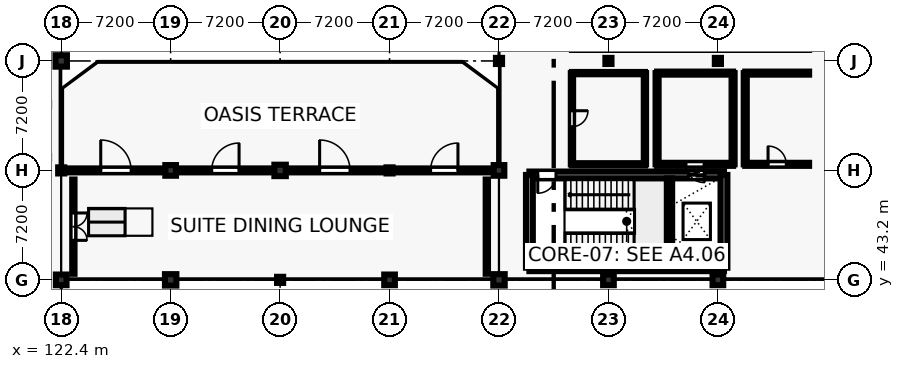
"""IFC4 building model, lengths in metres.
Left out: names, types, materials, properties, quantities, classifications, styles, units other than length and angle.
Written with IfcOpenShell. Run it as: python <this file> out.ifc"""

import sys

from ifc_helpers import new_model, si_unit, direction, frame, frame_2d, origin, origin_2d, place, context, subcontext, project, spatial, rectangle, hollow_rectangle, extrude, element, fill, save


model = new_model("IFC4")
c1 = context("Model", 3, precision=1e-05, world=origin(), true_north=direction((0.0, 1.0)))
c2 = subcontext(c1, "Body", "Model", "MODEL_VIEW")
j1 = project(units=[si_unit("LENGTHUNIT", "METRE"), si_unit("PLANEANGLEUNIT", "RADIAN")], contexts=[c1])
p1 = place(None, origin())
s1 = spatial("IfcSite", under=j1, at=p1, CompositionType="ELEMENT")
p2 = place(p1, origin())
s2 = spatial("IfcBuilding", under=s1, at=p2, CompositionType="ELEMENT")
p3 = place(p2, frame((0.0, 0.0, 9.6)))
s3 = spatial("IfcBuildingStorey", under=s2, at=p3, CompositionType="ELEMENT", Elevation=9.6)
p4 = place(p3, frame((122.4, 43.2, 0.0), z_axis=(0.0, 0.0, 1.0), x_axis=(1.0, 0.0, 0.0)))
e1 = element("IfcColumn", 1, at=p4, inside=s3, PredefinedType="COLUMN", context=c2, shape_type="SweptSolid", body=[
    extrude(rectangle(XDim=0.7, YDim=0.7, at=origin_2d()), origin(), (0.0, 0.0, 1.0), 4.2),
])
p5 = place(p3, frame((122.4, 50.4, 0.0), z_axis=(0.0, 0.0, 1.0), x_axis=(1.0, 0.0, 0.0)))
e2 = element("IfcColumn", 2, at=p5, inside=s3, PredefinedType="COLUMN", context=c2, shape_type="SweptSolid", body=[
    extrude(hollow_rectangle(XDim=0.4, YDim=0.4, WallThickness=0.02, at=origin_2d()), origin(), (0.0, 0.0, 1.0), 4.2),
])
for number, where, z_axis, x_axis in (
    (3, (122.4, 57.6, 0.0), (0.0, 0.0, 1.0), (1.0, 0.0, 0.0)),
    (4, (129.6, 43.2, 0.0), (0.0, 0.0, 1.0), (1.0, 0.0, 0.0)),
):
    element("IfcColumn", number, at=place(p3, frame(where, z_axis=z_axis, x_axis=x_axis)), inside=s3, PredefinedType="COLUMN", context=c2, shape_type="SweptSolid", body=[
        extrude(rectangle(XDim=0.75, YDim=0.75, at=origin_2d()), origin(), (0.0, 0.0, 1.0), 4.2),
    ])
p6 = place(p3, frame((129.6, 50.4, 0.0), z_axis=(0.0, 0.0, 1.0), x_axis=(1.0, 0.0, 0.0)))
e5 = element("IfcColumn", 5, at=p6, inside=s3, PredefinedType="COLUMN", context=c2, shape_type="SweptSolid", body=[
    extrude(rectangle(XDim=0.7, YDim=0.7, at=origin_2d()), origin(), (0.0, 0.0, 1.0), 4.2),
])
p7 = place(p3, frame((136.8, 43.2, 0.0), z_axis=(0.0, 0.0, 1.0), x_axis=(1.0, 0.0, 0.0)))
e6 = element("IfcColumn", 6, at=p7, inside=s3, PredefinedType="COLUMN", context=c2, shape_type="SweptSolid", body=[
    extrude(hollow_rectangle(XDim=0.4, YDim=0.4, WallThickness=0.02, at=origin_2d()), origin(), (0.0, 0.0, 1.0), 4.2),
])
p8 = place(p3, frame((136.8, 50.4, 0.0), z_axis=(0.0, 0.0, 1.0), x_axis=(1.0, 0.0, 0.0)))
e7 = element("IfcColumn", 7, at=p8, inside=s3, PredefinedType="COLUMN", context=c2, shape_type="SweptSolid", body=[
    extrude(rectangle(XDim=0.75, YDim=0.75, at=origin_2d()), origin(), (0.0, 0.0, 1.0), 4.2),
])
p9 = place(p3, frame((144.0, 43.2, 0.0), z_axis=(0.0, 0.0, 1.0), x_axis=(1.0, 0.0, 0.0)))
e8 = element("IfcColumn", 8, at=p9, inside=s3, PredefinedType="COLUMN", context=c2, shape_type="SweptSolid", body=[
    extrude(rectangle(XDim=0.7, YDim=0.7, at=origin_2d()), origin(), (0.0, 0.0, 1.0), 4.2),
])
p10 = place(p3, frame((144.0, 50.4, 0.0), z_axis=(0.0, 0.0, 1.0), x_axis=(1.0, 0.0, 0.0)))
e9 = element("IfcColumn", 9, at=p10, inside=s3, PredefinedType="COLUMN", context=c2, shape_type="SweptSolid", body=[
    extrude(hollow_rectangle(XDim=0.4, YDim=0.4, WallThickness=0.02, at=origin_2d()), origin(), (0.0, 0.0, 1.0), 4.2),
])
p11 = place(p3, frame((151.2, 43.2, 0.0), z_axis=(0.0, 0.0, 1.0), x_axis=(1.0, 0.0, 0.0)))
e10 = element("IfcColumn", 10, at=p11, inside=s3, PredefinedType="COLUMN", context=c2, shape_type="SweptSolid", body=[
    extrude(rectangle(XDim=0.75, YDim=0.75, at=origin_2d()), origin(), (0.0, 0.0, 1.0), 4.2),
])
p12 = place(p3, frame((151.2, 50.4, 0.0), z_axis=(0.0, 0.0, 1.0), x_axis=(1.0, 0.0, 0.0)))
e11 = element("IfcColumn", 11, at=p12, inside=s3, PredefinedType="COLUMN", context=c2, shape_type="SweptSolid", body=[
    extrude(rectangle(XDim=0.7, YDim=0.7, at=origin_2d()), origin(), (0.0, 0.0, 1.0), 4.2),
])
p13 = place(p3, frame((151.2, 57.6, 0.0), z_axis=(0.0, 0.0, 1.0), x_axis=(1.0, 0.0, 0.0)))
e12 = element("IfcColumn", 12, at=p13, inside=s3, PredefinedType="COLUMN", context=c2, shape_type="SweptSolid", body=[
    extrude(hollow_rectangle(XDim=0.4, YDim=0.4, WallThickness=0.02, at=origin_2d()), origin(), (0.0, 0.0, 1.0), 4.2),
])
p14 = place(p3, frame((158.4, 43.2, 0.0), z_axis=(0.0, 0.0, 1.0), x_axis=(1.0, 0.0, 0.0)))
e13 = element("IfcColumn", 13, at=p14, inside=s3, PredefinedType="COLUMN", context=c2, shape_type="SweptSolid", body=[
    extrude(rectangle(XDim=0.7, YDim=0.7, at=origin_2d()), origin(), (0.0, 0.0, 1.0), 4.2),
])
p15 = place(p3, frame((158.4, 57.6, 0.0), z_axis=(0.0, 0.0, 1.0), x_axis=(1.0, 0.0, 0.0)))
e14 = element("IfcColumn", 14, at=p15, inside=s3, PredefinedType="COLUMN", context=c2, shape_type="SweptSolid", body=[
    extrude(hollow_rectangle(XDim=0.4, YDim=0.4, WallThickness=0.02, at=origin_2d()), origin(), (0.0, 0.0, 1.0), 4.2),
])
p16 = place(p3, frame((165.6, 43.2, 0.0), z_axis=(0.0, 0.0, 1.0), x_axis=(1.0, 0.0, 0.0)))
e15 = element("IfcColumn", 15, at=p16, inside=s3, PredefinedType="COLUMN", context=c2, shape_type="SweptSolid", body=[
    extrude(rectangle(XDim=0.7, YDim=0.7, at=origin_2d()), origin(), (0.0, 0.0, 1.0), 4.2),
])
p17 = place(p3, frame((165.6, 57.6, 0.0), z_axis=(0.0, 0.0, 1.0), x_axis=(1.0, 0.0, 0.0)))
e16 = element("IfcColumn", 16, at=p17, inside=s3, PredefinedType="COLUMN", context=c2, shape_type="SweptSolid", body=[
    extrude(hollow_rectangle(XDim=0.4, YDim=0.4, WallThickness=0.02, at=origin_2d()), origin(), (0.0, 0.0, 1.0), 4.2),
])
p18 = place(p3, frame((153.2, 44.0, 0.0), z_axis=(0.0, 0.0, 1.0), x_axis=(1.0, 0.0, 0.0)))
e17 = element("IfcWall", 17, at=p18, inside=s3, PredefinedType="SHEAR", context=c2, shape_type="SweptSolid", body=[
    extrude(rectangle(XDim=12.8, YDim=0.45, at=frame_2d((6.4, 0.0))), origin(), (0.0, 0.0, 1.0), 3.88),
])
p19 = place(p3, frame((153.2, 50.1, 0.0), z_axis=(0.0, 0.0, 1.0), x_axis=(1.0, 0.0, 0.0)))
e18 = element("IfcWall", 18, at=p19, inside=s3, PredefinedType="SHEAR", context=c2, shape_type="SweptSolid", body=[
    extrude(rectangle(XDim=12.8, YDim=0.45, at=frame_2d((6.4, 0.0))), origin(), (0.0, 0.0, 1.0), 3.88),
])
p20 = place(p19, frame((0.55, 0.0, 0.0)))
e19 = element("IfcOpeningElement", 19, at=p20, cuts=e18, PredefinedType="OPENING", context=c2, shape_type="SweptSolid", body=[
    extrude(rectangle(XDim=1.2, YDim=2.25, at=frame_2d((0.6, 1.125))), frame((0.0, 0.235, 0.0), z_axis=(0.0, -1.0, 0.0), x_axis=(1.0, 0.0, 0.0)), (0.0, 0.0, 1.0), 0.47),
])
p21 = place(p19, frame((10.458, 0.0, 0.0)))
e20 = element("IfcOpeningElement", 20, at=p21, cuts=e18, PredefinedType="OPENING", context=c2, shape_type="SweptSolid", body=[
    extrude(rectangle(XDim=1.1, YDim=2.2, at=frame_2d((0.55, 1.1))), frame((0.0, 0.235, 0.0), z_axis=(0.0, -1.0, 0.0), x_axis=(1.0, 0.0, 0.0)), (0.0, 0.0, 1.0), 0.47),
])
for number, where, z_axis, x_axis in (
    (21, (153.2, 44.0, 0.0), (0.0, 0.0, 1.0), (0.0, 1.0, 0.0)),
    (22, (166.0, 44.0, 0.0), (0.0, 0.0, 1.0), (0.0, 1.0, 0.0)),
):
    element("IfcWall", number, at=place(p3, frame(where, z_axis=z_axis, x_axis=x_axis)), inside=s3, PredefinedType="SHEAR", context=c2, shape_type="SweptSolid", body=[
        extrude(rectangle(XDim=6.1, YDim=0.45, at=frame_2d((3.05, 0.0))), origin(), (0.0, 0.0, 1.0), 3.88),
    ])
p22 = place(p3, frame((162.416, 44.225, 0.0), z_axis=(0.0, 0.0, 1.0), x_axis=(0.0, 1.0, 0.0)))
e23 = element("IfcWall", 23, at=p22, inside=s3, PredefinedType="SHEAR", context=c2, shape_type="SweptSolid", body=[
    extrude(rectangle(XDim=5.65, YDim=0.35, at=frame_2d((2.825, 0.0))), origin(), (0.0, 0.0, 1.0), 3.88),
])
p23 = place(p3, frame((122.75, 50.4, 0.0), z_axis=(0.0, 0.0, 1.0), x_axis=(1.0, 0.0, 0.0)))
e24 = element("IfcWall", 24, at=p23, inside=s3, PredefinedType="SOLIDWALL", context=c2, shape_type="SweptSolid", body=[
    extrude(rectangle(XDim=6.5, YDim=0.26, at=frame_2d((3.25, 0.0))), origin(), (0.0, 0.0, 1.0), 2.94),
])
p24 = place(p23, frame((2.25, 0.0, 0.0)))
e25 = element("IfcOpeningElement", 25, at=p24, cuts=e24, PredefinedType="OPENING", context=c2, shape_type="SweptSolid", body=[
    extrude(rectangle(XDim=2.0, YDim=2.4, at=frame_2d((1.0, 1.2))), frame((0.0, 0.14, 0.0), z_axis=(0.0, -1.0, 0.0), x_axis=(1.0, 0.0, 0.0)), (0.0, 0.0, 1.0), 0.28),
])
p25 = place(p3, frame((129.95, 50.4, 0.0), z_axis=(0.0, 0.0, 1.0), x_axis=(1.0, 0.0, 0.0)))
e26 = element("IfcWall", 26, at=p25, inside=s3, PredefinedType="SOLIDWALL", context=c2, shape_type="SweptSolid", body=[
    extrude(rectangle(XDim=6.5, YDim=0.26, at=frame_2d((3.25, 0.0))), origin(), (0.0, 0.0, 1.0), 2.94),
])
p26 = place(p25, frame((2.35, 0.0, 0.0)))
e27 = element("IfcOpeningElement", 27, at=p26, cuts=e26, PredefinedType="OPENING", context=c2, shape_type="SweptSolid", body=[
    extrude(rectangle(XDim=1.8, YDim=2.35, at=frame_2d((0.9, 1.175))), frame((0.0, 0.14, 0.0), z_axis=(0.0, -1.0, 0.0), x_axis=(1.0, 0.0, 0.0)), (0.0, 0.0, 1.0), 0.28),
])
p27 = place(p3, frame((137.15, 50.4, 0.0), z_axis=(0.0, 0.0, 1.0), x_axis=(1.0, 0.0, 0.0)))
e28 = element("IfcWall", 28, at=p27, inside=s3, PredefinedType="SOLIDWALL", context=c2, shape_type="SweptSolid", body=[
    extrude(rectangle(XDim=6.5, YDim=0.26, at=frame_2d((3.25, 0.0))), origin(), (0.0, 0.0, 1.0), 2.94),
])
p28 = place(p27, frame((2.25, 0.0, 0.0)))
e29 = element("IfcOpeningElement", 29, at=p28, cuts=e28, PredefinedType="OPENING", context=c2, shape_type="SweptSolid", body=[
    extrude(rectangle(XDim=2.0, YDim=2.4, at=frame_2d((1.0, 1.2))), frame((0.0, 0.14, 0.0), z_axis=(0.0, -1.0, 0.0), x_axis=(1.0, 0.0, 0.0)), (0.0, 0.0, 1.0), 0.28),
])
p29 = place(p3, frame((144.35, 50.4, 0.0), z_axis=(0.0, 0.0, 1.0), x_axis=(1.0, 0.0, 0.0)))
e30 = element("IfcWall", 30, at=p29, inside=s3, PredefinedType="SOLIDWALL", context=c2, shape_type="SweptSolid", body=[
    extrude(rectangle(XDim=6.5, YDim=0.26, at=frame_2d((3.25, 0.0))), origin(), (0.0, 0.0, 1.0), 2.94),
])
p30 = place(p29, frame((2.35, 0.0, 0.0)))
e31 = element("IfcOpeningElement", 31, at=p30, cuts=e30, PredefinedType="OPENING", context=c2, shape_type="SweptSolid", body=[
    extrude(rectangle(XDim=1.8, YDim=2.35, at=frame_2d((0.9, 1.175))), frame((0.0, 0.14, 0.0), z_axis=(0.0, -1.0, 0.0), x_axis=(1.0, 0.0, 0.0)), (0.0, 0.0, 1.0), 0.28),
])
p31 = place(p3, frame((150.4, 43.6, 0.0), z_axis=(0.0, 0.0, 1.0), x_axis=(0.0, 1.0, 0.0)))
e32 = element("IfcWall", 32, at=p31, inside=s3, PredefinedType="PARTITIONING", context=c2, shape_type="SweptSolid", body=[
    extrude(rectangle(XDim=6.2, YDim=0.15, at=frame_2d((3.1, 0.0))), origin(), (0.0, 0.0, 1.0), 2.94),
])
p32 = place(p3, frame((123.2, 49.8, 0.0), z_axis=(0.0, 0.0, 1.0), x_axis=(0.0, -1.0, 0.0)))
e33 = element("IfcWall", 33, at=p32, inside=s3, PredefinedType="PARTITIONING", context=c2, shape_type="SweptSolid", body=[
    extrude(rectangle(XDim=6.2, YDim=0.15, at=frame_2d((3.1, 0.0))), origin(), (0.0, 0.0, 1.0), 2.94),
])
p33 = place(p32, frame((2.2, 0.0, 0.0)))
e34 = element("IfcOpeningElement", 34, at=p33, cuts=e33, PredefinedType="OPENING", context=c2, shape_type="SweptSolid", body=[
    extrude(rectangle(XDim=1.8, YDim=2.3, at=frame_2d((0.9, 1.15))), frame((0.0, 0.085, 0.0), z_axis=(0.0, -1.0, 0.0), x_axis=(1.0, 0.0, 0.0)), (0.0, 0.0, 1.0), 0.17),
])
p34 = place(p3, frame((156.0, 50.8, 0.0), z_axis=(0.0, 0.0, 1.0), x_axis=(1.0, 0.0, 0.0)))
e35 = element("IfcWall", 35, at=p34, inside=s3, PredefinedType="PARTITIONING", context=c2, shape_type="SweptSolid", body=[
    extrude(rectangle(XDim=4.8, YDim=0.15, at=frame_2d((2.4, 0.0))), origin(), (0.0, 0.0, 1.0), 2.94),
])
p35 = place(p3, frame((160.8, 50.8, 0.0), z_axis=(0.0, 0.0, 1.0), x_axis=(0.0, 1.0, 0.0)))
e36 = element("IfcWall", 36, at=p35, inside=s3, PredefinedType="PARTITIONING", context=c2, shape_type="SweptSolid", body=[
    extrude(rectangle(XDim=6.0, YDim=0.15, at=frame_2d((3.0, 0.0))), origin(), (0.0, 0.0, 1.0), 2.94),
])
p36 = place(p3, frame((160.8, 56.8, 0.0), z_axis=(0.0, 0.0, 1.0), x_axis=(-1.0, 0.0, 0.0)))
e37 = element("IfcWall", 37, at=p36, inside=s3, PredefinedType="PARTITIONING", context=c2, shape_type="SweptSolid", body=[
    extrude(rectangle(XDim=4.8, YDim=0.15, at=frame_2d((2.4, 0.0))), origin(), (0.0, 0.0, 1.0), 2.94),
])
p37 = place(p3, frame((156.0, 56.8, 0.0), z_axis=(0.0, 0.0, 1.0), x_axis=(0.0, -1.0, 0.0)))
e38 = element("IfcWall", 38, at=p37, inside=s3, PredefinedType="PARTITIONING", context=c2, shape_type="SweptSolid", body=[
    extrude(rectangle(XDim=6.0, YDim=0.15, at=frame_2d((3.0, 0.0))), origin(), (0.0, 0.0, 1.0), 2.94),
])
p38 = place(p37, frame((2.475, 0.0, 0.0)))
e39 = element("IfcOpeningElement", 39, at=p38, cuts=e38, PredefinedType="OPENING", context=c2, shape_type="SweptSolid", body=[
    extrude(rectangle(XDim=1.05, YDim=2.2, at=frame_2d((0.525, 1.1))), frame((0.0, 0.085, 0.0), z_axis=(0.0, -1.0, 0.0), x_axis=(1.0, 0.0, 0.0)), (0.0, 0.0, 1.0), 0.17),
])
p39 = place(p3, frame((161.6, 50.8, 0.0), z_axis=(0.0, 0.0, 1.0), x_axis=(1.0, 0.0, 0.0)))
e40 = element("IfcWall", 40, at=p39, inside=s3, PredefinedType="PARTITIONING", context=c2, shape_type="SweptSolid", body=[
    extrude(rectangle(XDim=5.0, YDim=0.2, at=frame_2d((2.5, 0.0))), origin(), (0.0, 0.0, 1.0), 2.94),
])
p40 = place(p39, frame((1.9, 0.0, 0.0)))
e41 = element("IfcOpeningElement", 41, at=p40, cuts=e40, PredefinedType="OPENING", context=c2, shape_type="SweptSolid", body=[
    extrude(rectangle(XDim=1.2, YDim=2.25, at=frame_2d((0.6, 1.125))), frame((0.0, 0.11, 0.0), z_axis=(0.0, -1.0, 0.0), x_axis=(1.0, 0.0, 0.0)), (0.0, 0.0, 1.0), 0.22),
])
p41 = place(p3, frame((166.6, 50.8, 0.0), z_axis=(0.0, 0.0, 1.0), x_axis=(0.0, 1.0, 0.0)))
e42 = element("IfcWall", 42, at=p41, inside=s3, PredefinedType="PARTITIONING", context=c2, shape_type="SweptSolid", body=[
    extrude(rectangle(XDim=6.0, YDim=0.2, at=frame_2d((3.0, 0.0))), origin(), (0.0, 0.0, 1.0), 2.94),
])
p42 = place(p3, frame((166.6, 56.8, 0.0), z_axis=(0.0, 0.0, 1.0), x_axis=(-1.0, 0.0, 0.0)))
e43 = element("IfcWall", 43, at=p42, inside=s3, PredefinedType="PARTITIONING", context=c2, shape_type="SweptSolid", body=[
    extrude(rectangle(XDim=5.0, YDim=0.2, at=frame_2d((2.5, 0.0))), origin(), (0.0, 0.0, 1.0), 2.94),
])
p43 = place(p3, frame((161.6, 56.8, 0.0), z_axis=(0.0, 0.0, 1.0), x_axis=(0.0, -1.0, 0.0)))
e44 = element("IfcWall", 44, at=p43, inside=s3, PredefinedType="PARTITIONING", context=c2, shape_type="SweptSolid", body=[
    extrude(rectangle(XDim=6.0, YDim=0.2, at=frame_2d((3.0, 0.0))), origin(), (0.0, 0.0, 1.0), 2.94),
])
p44 = place(p3, frame((167.4, 50.8, 0.0), z_axis=(0.0, 0.0, 1.0), x_axis=(1.0, 0.0, 0.0)))
e45 = element("IfcWall", 45, at=p44, inside=s3, PredefinedType="PARTITIONING", context=c2, shape_type="SweptSolid", body=[
    extrude(rectangle(XDim=4.2, YDim=0.2, at=frame_2d((2.1, 0.0))), origin(), (0.0, 0.0, 1.0), 2.94),
])
p45 = place(p44, frame((1.5, 0.0, 0.0)))
e46 = element("IfcOpeningElement", 46, at=p45, cuts=e45, PredefinedType="OPENING", context=c2, shape_type="SweptSolid", body=[
    extrude(rectangle(XDim=1.2, YDim=2.25, at=frame_2d((0.6, 1.125))), frame((0.0, 0.11, 0.0), z_axis=(0.0, -1.0, 0.0), x_axis=(1.0, 0.0, 0.0)), (0.0, 0.0, 1.0), 0.22),
])
p46 = place(p3, frame((171.6, 56.8, 0.0), z_axis=(0.0, 0.0, 1.0), x_axis=(-1.0, 0.0, 0.0)))
e47 = element("IfcWall", 47, at=p46, inside=s3, PredefinedType="PARTITIONING", context=c2, shape_type="SweptSolid", body=[
    extrude(rectangle(XDim=4.2, YDim=0.2, at=frame_2d((2.1, 0.0))), origin(), (0.0, 0.0, 1.0), 2.94),
])
p47 = place(p3, frame((167.4, 56.8, 0.0), z_axis=(0.0, 0.0, 1.0), x_axis=(0.0, -1.0, 0.0)))
e48 = element("IfcWall", 48, at=p47, inside=s3, PredefinedType="PARTITIONING", context=c2, shape_type="SweptSolid", body=[
    extrude(rectangle(XDim=6.0, YDim=0.2, at=frame_2d((3.0, 0.0))), origin(), (0.0, 0.0, 1.0), 2.94),
])
p48 = place(p24, origin())
e49 = element("IfcDoor", 49, at=p48, inside=s3, OperationType="SINGLE_SWING_LEFT", PredefinedType="DOOR", context=c2, shape_type="SweptSolid", body=[
    extrude(rectangle(XDim=2.0, YDim=2.4, at=frame_2d((1.0, 1.2))), frame((0.0, 0.025, 0.0), z_axis=(0.0, -1.0, 0.0), x_axis=(1.0, 0.0, 0.0)), (0.0, 0.0, 1.0), 0.05),
])
fill(e25, e49)
p49 = place(p26, origin())
e50 = element("IfcDoor", 50, at=p49, inside=s3, OperationType="SINGLE_SWING_RIGHT", PredefinedType="DOOR", context=c2, shape_type="SweptSolid", body=[
    extrude(rectangle(XDim=1.8, YDim=2.35, at=frame_2d((0.9, 1.175))), frame((0.0, 0.025, 0.0), z_axis=(0.0, -1.0, 0.0), x_axis=(1.0, 0.0, 0.0)), (0.0, 0.0, 1.0), 0.05),
])
fill(e27, e50)
p50 = place(p28, origin())
e51 = element("IfcDoor", 51, at=p50, inside=s3, OperationType="SINGLE_SWING_LEFT", PredefinedType="DOOR", context=c2, shape_type="SweptSolid", body=[
    extrude(rectangle(XDim=2.0, YDim=2.4, at=frame_2d((1.0, 1.2))), frame((0.0, 0.025, 0.0), z_axis=(0.0, -1.0, 0.0), x_axis=(1.0, 0.0, 0.0)), (0.0, 0.0, 1.0), 0.05),
])
fill(e29, e51)
p51 = place(p30, origin())
e52 = element("IfcDoor", 52, at=p51, inside=s3, OperationType="SINGLE_SWING_RIGHT", PredefinedType="DOOR", context=c2, shape_type="SweptSolid", body=[
    extrude(rectangle(XDim=1.8, YDim=2.35, at=frame_2d((0.9, 1.175))), frame((0.0, 0.025, 0.0), z_axis=(0.0, -1.0, 0.0), x_axis=(1.0, 0.0, 0.0)), (0.0, 0.0, 1.0), 0.05),
])
fill(e31, e52)
p52 = place(p20, frame((1.2, 0.0, 0.0), z_axis=(0.0, 0.0, 1.0), x_axis=(-1.0, 0.0, 0.0)))
e53 = element("IfcDoor", 53, at=p52, inside=s3, OperationType="SINGLE_SWING_LEFT", PredefinedType="DOOR", context=c2, shape_type="SweptSolid", body=[
    extrude(rectangle(XDim=1.2, YDim=2.25, at=frame_2d((0.6, 1.125))), frame((0.0, 0.025, 0.0), z_axis=(0.0, -1.0, 0.0), x_axis=(1.0, 0.0, 0.0)), (0.0, 0.0, 1.0), 0.05),
])
fill(e19, e53)
p53 = place(p21, origin())
e54 = element("IfcDoor", 54, at=p53, inside=s3, OperationType="SLIDING_TO_RIGHT", PredefinedType="DOOR", context=c2, shape_type="SweptSolid", body=[
    extrude(rectangle(XDim=1.1, YDim=2.2, at=frame_2d((0.55, 1.1))), frame((0.0, 0.025, 0.0), z_axis=(0.0, -1.0, 0.0), x_axis=(1.0, 0.0, 0.0)), (0.0, 0.0, 1.0), 0.05),
])
fill(e20, e54)
p54 = place(p33, origin())
e55 = element("IfcDoor", 55, at=p54, inside=s3, OperationType="DOUBLE_DOOR_SINGLE_SWING", PredefinedType="DOOR", context=c2, shape_type="SweptSolid", body=[
    extrude(rectangle(XDim=1.8, YDim=2.3, at=frame_2d((0.9, 1.15))), frame((0.0, 0.025, 0.0), z_axis=(0.0, -1.0, 0.0), x_axis=(1.0, 0.0, 0.0)), (0.0, 0.0, 1.0), 0.05),
])
fill(e34, e55)
p55 = place(p38, origin())
e56 = element("IfcDoor", 56, at=p55, inside=s3, OperationType="SINGLE_SWING_LEFT", PredefinedType="DOOR", context=c2, shape_type="SweptSolid", body=[
    extrude(rectangle(XDim=1.05, YDim=2.2, at=frame_2d((0.525, 1.1))), frame((0.0, 0.025, 0.0), z_axis=(0.0, -1.0, 0.0), x_axis=(1.0, 0.0, 0.0)), (0.0, 0.0, 1.0), 0.05),
])
fill(e39, e56)
p56 = place(p40, frame((1.2, 0.0, 0.0), z_axis=(0.0, 0.0, 1.0), x_axis=(-1.0, 0.0, 0.0)))
e57 = element("IfcDoor", 57, at=p56, inside=s3, OperationType="SINGLE_SWING_RIGHT", PredefinedType="DOOR", context=c2, shape_type="SweptSolid", body=[
    extrude(rectangle(XDim=1.2, YDim=2.25, at=frame_2d((0.6, 1.125))), frame((0.0, 0.025, 0.0), z_axis=(0.0, -1.0, 0.0), x_axis=(1.0, 0.0, 0.0)), (0.0, 0.0, 1.0), 0.05),
])
fill(e41, e57)
p57 = place(p45, origin())
e58 = element("IfcDoor", 58, at=p57, inside=s3, OperationType="SINGLE_SWING_LEFT", PredefinedType="DOOR", context=c2, shape_type="SweptSolid", body=[
    extrude(rectangle(XDim=1.2, YDim=2.25, at=frame_2d((0.6, 1.125))), frame((0.0, 0.025, 0.0), z_axis=(0.0, -1.0, 0.0), x_axis=(1.0, 0.0, 0.0)), (0.0, 0.0, 1.0), 0.05),
])
fill(e46, e58)
save(model, sys.argv[1])
